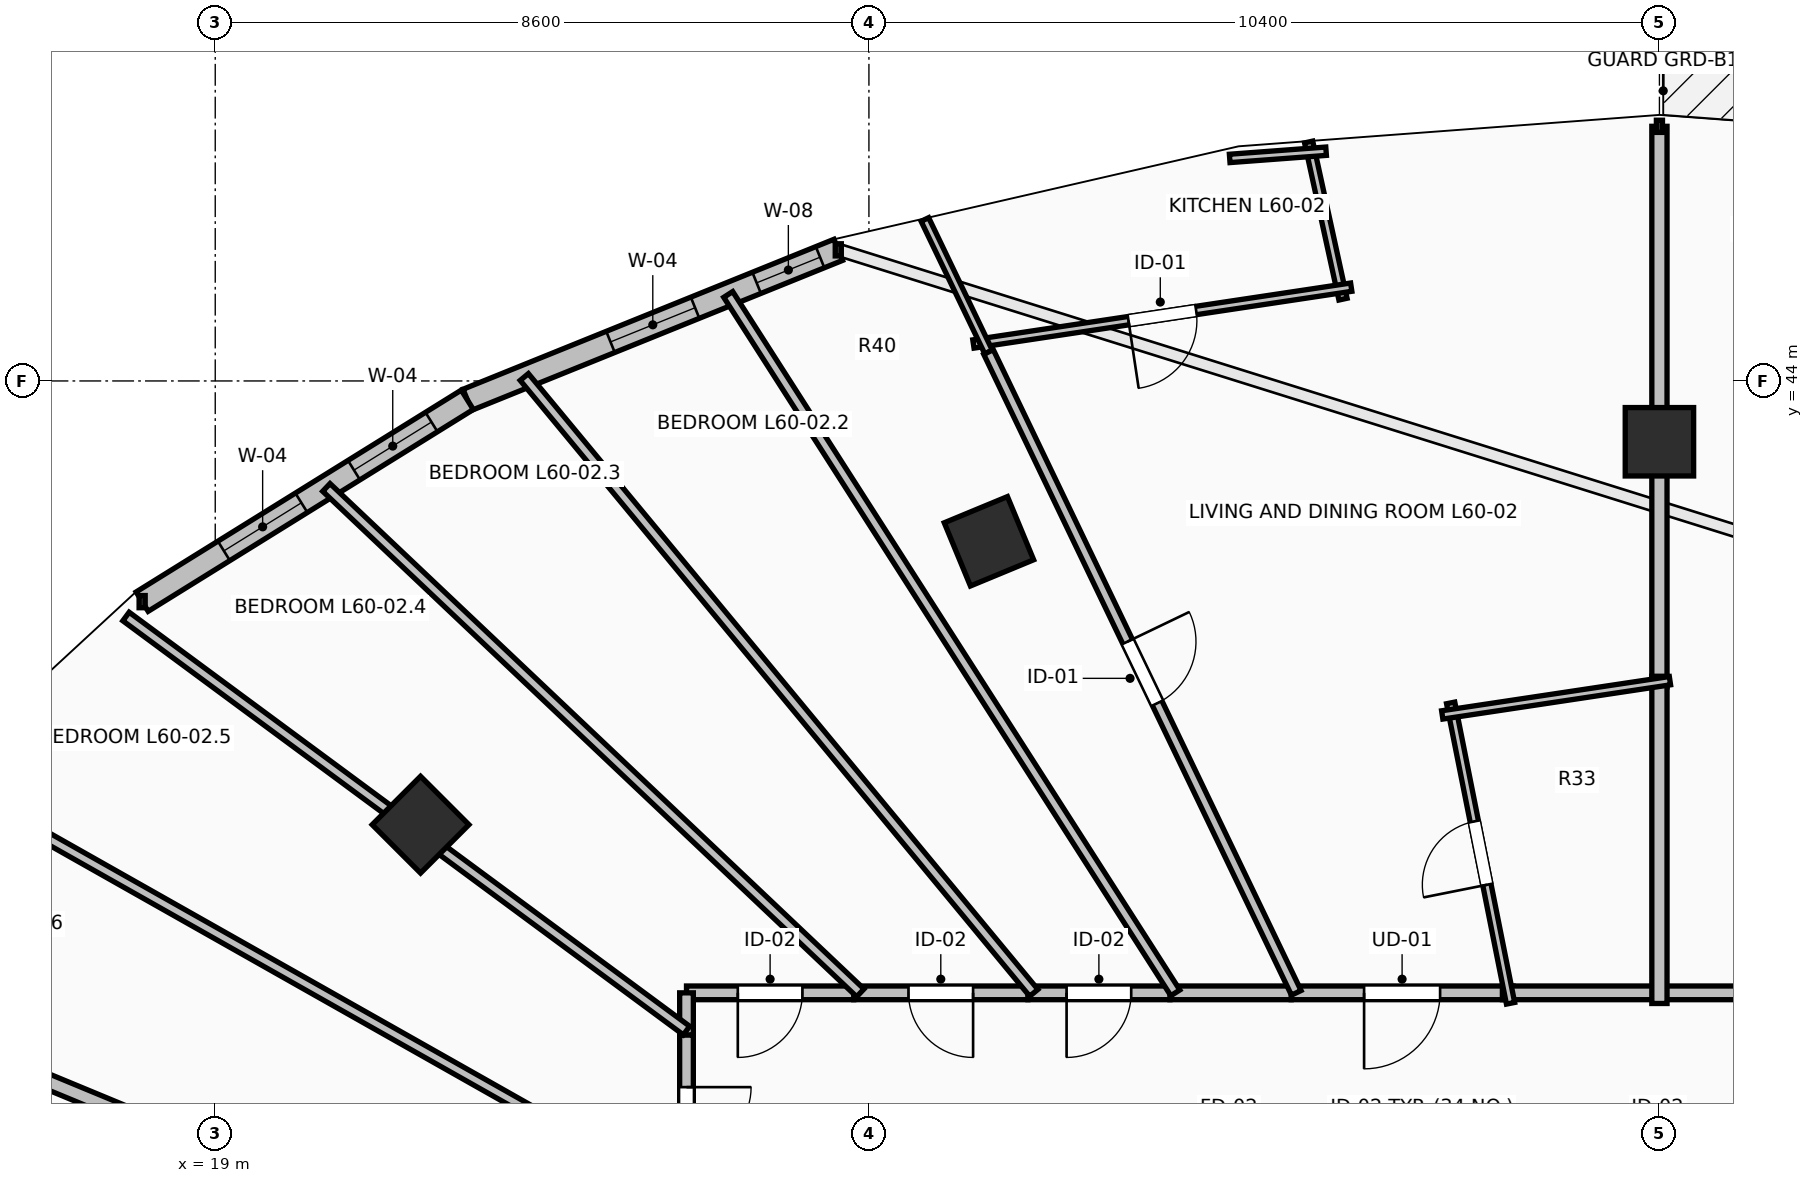
"""IFC4 building model, lengths in metres.
Left out: names, types, materials, properties, quantities, classifications, styles, units other than length and angle.
Written with IfcOpenShell. Run it as: python <this file> out.ifc"""

import sys

from ifc_helpers import new_model, si_unit, direction, frame, frame_2d, origin, origin_2d, place, context, subcontext, project, spatial, rectangle, extrude, element, fill, save


model = new_model("IFC4")
c1 = context("Model", 3, precision=1e-05, world=origin(), true_north=direction((0.0, 1.0)))
c2 = subcontext(c1, "Body", "Model", "MODEL_VIEW")
j1 = project(units=[si_unit("LENGTHUNIT", "METRE"), si_unit("PLANEANGLEUNIT", "RADIAN")], contexts=[c1])
p1 = place(None, origin())
s1 = spatial("IfcSite", under=j1, at=p1, CompositionType="ELEMENT")
p2 = place(p1, origin())
s2 = spatial("IfcBuilding", under=s1, at=p2, CompositionType="ELEMENT")
p3 = place(p2, frame((0.0, 0.0, 221.4)))
s3 = spatial("IfcBuildingStorey", under=s2, at=p3, CompositionType="ELEMENT", Elevation=221.4)
for number, where, z_axis, x_axis in (
    (1, (38.0, 43.2, 0.0), (0.0, 0.0, 1.0), (0.0, 1.0, 0.0)),
    (2, (29.179, 41.891, 0.0), (0.0, 0.0, 1.0), (-0.383, 0.924, 0.0)),
    (3, (21.701, 38.162, 0.0), (0.0, 0.0, 1.0), (-0.707, 0.707, 0.0)),
):
    element("IfcColumn", number, at=place(p3, frame(where, z_axis=z_axis, x_axis=x_axis)), inside=s3, PredefinedType="COLUMN", context=c2, shape_type="SweptSolid", body=[
        extrude(rectangle(XDim=0.9, YDim=0.9, at=origin_2d()), origin(), (0.0, 0.0, 1.0), 3.55),
    ])
p4 = place(p3, frame((27.197, 45.725, 0.0), z_axis=(0.0, 0.0, 1.0), x_axis=(-0.927111094334, -0.374786630981, 0.0)))
e4 = element("IfcWall", 4, at=p4, inside=s3, PredefinedType="STANDARD", context=c2, shape_type="SweptSolid", body=[
    extrude(rectangle(XDim=5.264, YDim=0.3, at=frame_2d((2.632, 0.0))), origin(), (0.0, 0.0, 1.0), 3.2),
])
p5 = place(p4, frame((0.258, 0.0, 0.85)))
e5 = element("IfcOpeningElement", 5, at=p5, cuts=e4, PredefinedType="OPENING", context=c2, shape_type="SweptSolid", body=[
    extrude(rectangle(XDim=0.9, YDim=1.8, at=frame_2d((0.45, 0.9))), frame((0.0, 0.165, 0.0), z_axis=(0.0, -1.0, 0.0), x_axis=(1.0, 0.0, 0.0)), (0.0, 0.0, 1.0), 0.33),
])
p6 = place(p4, frame((2.032, 0.0, 0.85)))
e6 = element("IfcOpeningElement", 6, at=p6, cuts=e4, PredefinedType="OPENING", context=c2, shape_type="SweptSolid", body=[
    extrude(rectangle(XDim=1.2, YDim=1.95, at=frame_2d((0.6, 0.975))), frame((0.0, 0.165, 0.0), z_axis=(0.0, -1.0, 0.0), x_axis=(1.0, 0.0, 0.0)), (0.0, 0.0, 1.0), 0.33),
])
p7 = place(p3, frame((22.316, 43.752, 0.0), z_axis=(0.0, 0.0, 1.0), x_axis=(-0.849647657754, -0.527350791858, 0.0)))
e7 = element("IfcWall", 7, at=p7, inside=s3, PredefinedType="STANDARD", context=c2, shape_type="SweptSolid", body=[
    extrude(rectangle(XDim=5.035, YDim=0.3, at=frame_2d((2.518, 0.0))), origin(), (0.0, 0.0, 1.0), 3.2),
])
p8 = place(p7, frame((0.555, 0.0, 0.85)))
e8 = element("IfcOpeningElement", 8, at=p8, cuts=e7, PredefinedType="OPENING", context=c2, shape_type="SweptSolid", body=[
    extrude(rectangle(XDim=1.2, YDim=1.95, at=frame_2d((0.6, 0.975))), frame((0.0, 0.165, 0.0), z_axis=(0.0, -1.0, 0.0), x_axis=(1.0, 0.0, 0.0)), (0.0, 0.0, 1.0), 0.33),
])
p9 = place(p7, frame((2.569, 0.0, 0.85)))
e9 = element("IfcOpeningElement", 9, at=p9, cuts=e7, PredefinedType="OPENING", context=c2, shape_type="SweptSolid", body=[
    extrude(rectangle(XDim=1.2, YDim=1.95, at=frame_2d((0.6, 0.975))), frame((0.0, 0.165, 0.0), z_axis=(0.0, -1.0, 0.0), x_axis=(1.0, 0.0, 0.0)), (0.0, 0.0, 1.0), 0.33),
])
p10 = place(p3, frame((39.157, 35.95, 0.0), z_axis=(0.0, 0.0, 1.0), x_axis=(-1.0, 0.0, 0.0)))
e10 = element("IfcWall", 10, at=p10, inside=s3, PredefinedType="PARTITIONING", context=c2, shape_type="SweptSolid", body=[
    extrude(rectangle(XDim=1.217, YDim=0.18, at=frame_2d((0.608, 0.0))), origin(), (0.0, 0.0, 1.0), 3.2),
])
p11 = place(p3, frame((36.074, 35.95, 0.0), z_axis=(0.0, 0.0, 1.0), x_axis=(-1.0, 0.0, 0.0)))
e11 = element("IfcWall", 11, at=p11, inside=s3, PredefinedType="PARTITIONING", context=c2, shape_type="SweptSolid", body=[
    extrude(rectangle(XDim=2.919, YDim=0.18, at=frame_2d((1.459, 0.0))), origin(), (0.0, 0.0, 1.0), 3.2),
])
p12 = place(p11, frame((0.959, 0.0, 0.0)))
e12 = element("IfcOpeningElement", 12, at=p12, cuts=e11, PredefinedType="OPENING", context=c2, shape_type="SweptSolid", body=[
    extrude(rectangle(XDim=1.0, YDim=2.15, at=frame_2d((0.5, 1.075))), frame((0.0, 0.105, 0.0), z_axis=(0.0, -1.0, 0.0), x_axis=(1.0, 0.0, 0.0)), (0.0, 0.0, 1.0), 0.21),
])
p13 = place(p3, frame((38.08, 35.95, 0.0), z_axis=(0.0, 0.0, 1.0), x_axis=(-1.0, 0.0, 0.0)))
e13 = element("IfcWall", 13, at=p13, inside=s3, PredefinedType="PARTITIONING", context=c2, shape_type="SweptSolid", body=[
    extrude(rectangle(XDim=2.146, YDim=0.18, at=frame_2d((1.073, 0.0))), origin(), (0.0, 0.0, 1.0), 3.2),
])
p14 = place(p3, frame((33.155, 35.95, 0.0), z_axis=(0.0, 0.0, 1.0), x_axis=(-1.0, 0.0, 0.0)))
e14 = element("IfcWall", 14, at=p14, inside=s3, PredefinedType="PARTITIONING", context=c2, shape_type="SweptSolid", body=[
    extrude(rectangle(XDim=1.595, YDim=0.18, at=frame_2d((0.797, 0.0))), origin(), (0.0, 0.0, 1.0), 3.2),
])
p15 = place(p3, frame((31.56, 35.95, 0.0), z_axis=(0.0, 0.0, 1.0), x_axis=(-1.0, 0.0, 0.0)))
e15 = element("IfcWall", 15, at=p15, inside=s3, PredefinedType="PARTITIONING", context=c2, shape_type="SweptSolid", body=[
    extrude(rectangle(XDim=1.869, YDim=0.18, at=frame_2d((0.935, 0.0))), origin(), (0.0, 0.0, 1.0), 2.392),
])
p16 = place(p15, frame((0.51, 0.0, 0.0)))
e16 = element("IfcOpeningElement", 16, at=p16, cuts=e15, PredefinedType="OPENING", context=c2, shape_type="SweptSolid", body=[
    extrude(rectangle(XDim=0.85, YDim=2.1, at=frame_2d((0.425, 1.05))), frame((0.0, 0.105, 0.0), z_axis=(0.0, -1.0, 0.0), x_axis=(1.0, 0.0, 0.0)), (0.0, 0.0, 1.0), 0.21),
])
p17 = place(p3, frame((29.691, 35.95, 0.0), z_axis=(0.0, 0.0, 1.0), x_axis=(-1.0, 0.0, 0.0)))
e17 = element("IfcWall", 17, at=p17, inside=s3, PredefinedType="PARTITIONING", context=c2, shape_type="SweptSolid", body=[
    extrude(rectangle(XDim=2.291, YDim=0.18, at=frame_2d((1.146, 0.0))), origin(), (0.0, 0.0, 1.0), 2.392),
])
p18 = place(p17, frame((0.72, 0.0, 0.0)))
e18 = element("IfcOpeningElement", 18, at=p18, cuts=e17, PredefinedType="OPENING", context=c2, shape_type="SweptSolid", body=[
    extrude(rectangle(XDim=0.85, YDim=2.1, at=frame_2d((0.425, 1.05))), frame((0.0, 0.105, 0.0), z_axis=(0.0, -1.0, 0.0), x_axis=(1.0, 0.0, 0.0)), (0.0, 0.0, 1.0), 0.21),
])
p19 = place(p3, frame((27.4, 35.95, 0.0), z_axis=(0.0, 0.0, 1.0), x_axis=(-1.0, 0.0, 0.0)))
e19 = element("IfcWall", 19, at=p19, inside=s3, PredefinedType="PARTITIONING", context=c2, shape_type="SweptSolid", body=[
    extrude(rectangle(XDim=2.2, YDim=0.18, at=frame_2d((1.1, 0.0))), origin(), (0.0, 0.0, 1.0), 2.834),
])
p20 = place(p19, frame((0.675, 0.0, 0.0)))
e20 = element("IfcOpeningElement", 20, at=p20, cuts=e19, PredefinedType="OPENING", context=c2, shape_type="SweptSolid", body=[
    extrude(rectangle(XDim=0.85, YDim=2.1, at=frame_2d((0.425, 1.05))), frame((0.0, 0.105, 0.0), z_axis=(0.0, -1.0, 0.0), x_axis=(1.0, 0.0, 0.0)), (0.0, 0.0, 1.0), 0.21),
])
p21 = place(p3, frame((25.2, 35.95, 0.0), z_axis=(0.0, 0.0, 1.0), x_axis=(0.0, -1.0, 0.0)))
e21 = element("IfcWall", 21, at=p21, inside=s3, PredefinedType="PARTITIONING", context=c2, shape_type="SweptSolid", body=[
    extrude(rectangle(XDim=0.556, YDim=0.18, at=frame_2d((0.278, 0.0))), origin(), (0.0, 0.0, 1.0), 3.2),
])
p22 = place(p3, frame((25.2, 35.394, 0.0), z_axis=(0.0, 0.0, 1.0), x_axis=(0.0, -1.0, 0.0)))
e22 = element("IfcWall", 22, at=p22, inside=s3, PredefinedType="PARTITIONING", context=c2, shape_type="SweptSolid", body=[
    extrude(rectangle(XDim=2.219, YDim=0.18, at=frame_2d((1.109, 0.0))), origin(), (0.0, 0.0, 1.0), 2.392),
])
p23 = place(p22, frame((0.685, 0.0, 0.0)))
e23 = element("IfcOpeningElement", 23, at=p23, cuts=e22, PredefinedType="OPENING", context=c2, shape_type="SweptSolid", body=[
    extrude(rectangle(XDim=0.85, YDim=2.1, at=frame_2d((0.425, 1.05))), frame((0.0, 0.105, 0.0), z_axis=(0.0, -1.0, 0.0), x_axis=(1.0, 0.0, 0.0)), (0.0, 0.0, 1.0), 0.21),
])
p24 = place(p3, frame((38.0, 47.35, 0.0), z_axis=(0.0, 0.0, 1.0), x_axis=(0.0, -1.0, 0.0)))
e24 = element("IfcWall", 24, at=p24, inside=s3, PredefinedType="PARTITIONING", context=c2, shape_type="SweptSolid", body=[
    extrude(rectangle(XDim=7.375, YDim=0.2, at=frame_2d((3.688, 0.0))), origin(), (0.0, 0.0, 1.0), 2.889),
])
p25 = place(p3, frame((38.0, 40.115, 0.0), z_axis=(0.0, 0.0, 1.0), x_axis=(0.0, -1.0, 0.0)))
e25 = element("IfcWall", 25, at=p25, inside=s3, PredefinedType="PARTITIONING", context=c2, shape_type="SweptSolid", body=[
    extrude(rectangle(XDim=4.305, YDim=0.2, at=frame_2d((2.152, 0.0))), origin(), (0.0, 0.0, 1.0), 2.834),
])
p26 = place(p3, frame((36.042, 35.813, 0.0), z_axis=(0.0, 0.0, 1.0), x_axis=(-0.195521857349, 0.980699343988, 0.0)))
e26 = element("IfcWall", 26, at=p26, inside=s3, PredefinedType="PARTITIONING", context=c2, shape_type="SweptSolid", body=[
    extrude(rectangle(XDim=4.03, YDim=0.11, at=frame_2d((2.015, 0.0))), origin(), (0.0, 0.0, 1.0), 2.834),
])
p27 = place(p26, frame((1.59, 0.0, 0.0)))
e27 = element("IfcOpeningElement", 27, at=p27, cuts=e26, PredefinedType="OPENING", context=c2, shape_type="SweptSolid", body=[
    extrude(rectangle(XDim=0.85, YDim=2.1, at=frame_2d((0.425, 1.05))), frame((0.0, 0.07, 0.0), z_axis=(0.0, -1.0, 0.0), x_axis=(1.0, 0.0, 0.0)), (0.0, 0.0, 1.0), 0.14),
])
p28 = place(p3, frame((35.143, 39.606, 0.0), z_axis=(0.0, 0.0, 1.0), x_axis=(0.988873015636, 0.148762088409, 0.0)))
e28 = element("IfcWall", 28, at=p28, inside=s3, PredefinedType="PARTITIONING", context=c2, shape_type="SweptSolid", body=[
    extrude(rectangle(XDim=3.03, YDim=0.11, at=frame_2d((1.515, 0.0))), origin(), (0.0, 0.0, 1.0), 2.889),
])
p29 = place(p3, frame((33.385, 47.144, 0.0), z_axis=(0.0, 0.0, 1.0), x_axis=(0.213521424511, -0.976938381514, 0.0)))
e29 = element("IfcWall", 29, at=p29, inside=s3, PredefinedType="PARTITIONING", context=c2, shape_type="SweptSolid", body=[
    extrude(rectangle(XDim=2.116, YDim=0.11, at=frame_2d((1.058, 0.0))), origin(), (0.0, 0.0, 1.0), 3.2),
])
p30 = place(p3, frame((33.945, 45.234, 0.0), z_axis=(0.0, 0.0, 1.0), x_axis=(-0.988872134662, -0.148767944424, 0.0)))
e30 = element("IfcWall", 30, at=p30, inside=s3, PredefinedType="PARTITIONING", context=c2, shape_type="SweptSolid", body=[
    extrude(rectangle(XDim=5.027, YDim=0.11, at=frame_2d((2.513, 0.0))), origin(), (0.0, 0.0, 1.0), 3.2),
])
p31 = place(p30, frame((2.063, 0.0, 0.0)))
e31 = element("IfcOpeningElement", 31, at=p31, cuts=e30, PredefinedType="OPENING", context=c2, shape_type="SweptSolid", body=[
    extrude(rectangle(XDim=0.9, YDim=2.1, at=frame_2d((0.45, 1.05))), frame((0.0, 0.07, 0.0), z_axis=(0.0, -1.0, 0.0), x_axis=(1.0, 0.0, 0.0)), (0.0, 0.0, 1.0), 0.14),
])
p32 = place(p3, frame((29.174, 44.381, 0.0), z_axis=(0.0, 0.0, 1.0), x_axis=(-0.432866492457, 0.901458041014, 0.0)))
e32 = element("IfcWall", 32, at=p32, inside=s3, PredefinedType="PARTITIONING", context=c2, shape_type="SweptSolid", body=[
    extrude(rectangle(XDim=1.934, YDim=0.11, at=frame_2d((0.967, 0.0))), origin(), (0.0, 0.0, 1.0), 3.2),
])
p33 = place(p3, frame((33.615, 47.022, 0.0), z_axis=(0.0, 0.0, 1.0), x_axis=(-0.997207179737, -0.074684942803, 0.0)))
e33 = element("IfcWall", 33, at=p33, inside=s3, PredefinedType="PARTITIONING", context=c2, shape_type="SweptSolid", body=[
    extrude(rectangle(XDim=1.272, YDim=0.11, at=frame_2d((0.636, 0.0))), origin(), (0.0, 0.0, 1.0), 3.2),
])
p34 = place(p3, frame((29.174, 44.381, 0.0), z_axis=(0.0, 0.0, 1.0), x_axis=(0.432861754343, -0.901460316169, 0.0)))
e34 = element("IfcWall", 34, at=p34, inside=s3, PredefinedType="PARTITIONING", context=c2, shape_type="SweptSolid", body=[
    extrude(rectangle(XDim=9.353, YDim=0.14, at=frame_2d((4.676, 0.0))), origin(), (0.0, 0.0, 1.0), 2.392),
])
p35 = place(p34, frame((4.226, 0.0, 0.0)))
e35 = element("IfcOpeningElement", 35, at=p35, cuts=e34, PredefinedType="OPENING", context=c2, shape_type="SweptSolid", body=[
    extrude(rectangle(XDim=0.9, YDim=2.1, at=frame_2d((0.45, 1.05))), frame((0.0, 0.085, 0.0), z_axis=(0.0, -1.0, 0.0), x_axis=(1.0, 0.0, 0.0)), (0.0, 0.0, 1.0), 0.17),
])
p36 = place(p3, frame((25.749, 45.138, 0.0), z_axis=(0.0, 0.0, 1.0), x_axis=(0.539168632786, -0.842197830335, 0.0)))
e36 = element("IfcWall", 36, at=p36, inside=s3, PredefinedType="PARTITIONING", context=c2, shape_type="SweptSolid", body=[
    extrude(rectangle(XDim=10.909, YDim=0.14, at=frame_2d((5.455, 0.0))), origin(), (0.0, 0.0, 1.0), 2.392),
])
p37 = place(p3, frame((23.066, 44.052, 0.0), z_axis=(0.0, 0.0, 1.0), x_axis=(0.637453668746, -0.770488689211, 0.0)))
e37 = element("IfcWall", 37, at=p37, inside=s3, PredefinedType="PARTITIONING", context=c2, shape_type="SweptSolid", body=[
    extrude(rectangle(XDim=10.515, YDim=0.14, at=frame_2d((5.258, 0.0))), origin(), (0.0, 0.0, 1.0), 2.392),
])
p38 = place(p3, frame((20.462, 42.599, 0.0), z_axis=(0.0, 0.0, 1.0), x_axis=(0.726274273347, -0.687405033349, 0.0)))
e38 = element("IfcWall", 38, at=p38, inside=s3, PredefinedType="PARTITIONING", context=c2, shape_type="SweptSolid", body=[
    extrude(rectangle(XDim=9.673, YDim=0.14, at=frame_2d((4.836, 0.0))), origin(), (0.0, 0.0, 1.0), 2.734),
])
p39 = place(p3, frame((17.826, 40.901, 0.0), z_axis=(0.0, 0.0, 1.0), x_axis=(0.804363169868, -0.594137939338, 0.0)))
e39 = element("IfcWall", 39, at=p39, inside=s3, PredefinedType="PARTITIONING", context=c2, shape_type="SweptSolid", body=[
    extrude(rectangle(XDim=9.167, YDim=0.14, at=frame_2d((4.584, 0.0))), origin(), (0.0, 0.0, 1.0), 2.392),
])
p40 = place(p3, frame((15.476, 38.731, 0.0), z_axis=(0.0, 0.0, 1.0), x_axis=(0.870572608778, -0.49203997078, 0.0)))
e40 = element("IfcWall", 40, at=p40, inside=s3, PredefinedType="PARTITIONING", context=c2, shape_type="SweptSolid", body=[
    extrude(rectangle(XDim=11.169, YDim=0.14, at=frame_2d((5.585, 0.0))), origin(), (0.0, 0.0, 1.0), 2.734),
])
p41 = place(p3, frame((13.36, 36.206, 0.0), z_axis=(0.0, 0.0, 1.0), x_axis=(0.923875681471, -0.382692729466, 0.0)))
e41 = element("IfcWall", 41, at=p41, inside=s3, PredefinedType="PARTITIONING", context=c2, shape_type="SweptSolid", body=[
    extrude(rectangle(XDim=9.381, YDim=0.2, at=frame_2d((4.69, 0.0))), origin(), (0.0, 0.0, 1.0), 2.734),
])
p42 = place(p5, origin())
e42 = element("IfcWindow", 42, at=p42, inside=s3, PartitioningType="SINGLE_PANEL", PredefinedType="WINDOW", context=c2, shape_type="SweptSolid", body=[
    extrude(rectangle(XDim=0.9, YDim=1.8, at=frame_2d((0.45, 0.9))), frame((0.0, 0.03, 0.0), z_axis=(0.0, -1.0, 0.0), x_axis=(1.0, 0.0, 0.0)), (0.0, 0.0, 1.0), 0.06),
])
fill(e5, e42)
p43 = place(p6, origin())
e43 = element("IfcWindow", 43, at=p43, inside=s3, PartitioningType="SINGLE_PANEL", PredefinedType="WINDOW", context=c2, shape_type="SweptSolid", body=[
    extrude(rectangle(XDim=1.2, YDim=1.95, at=frame_2d((0.6, 0.975))), frame((0.0, 0.03, 0.0), z_axis=(0.0, -1.0, 0.0), x_axis=(1.0, 0.0, 0.0)), (0.0, 0.0, 1.0), 0.06),
])
fill(e6, e43)
p44 = place(p8, origin())
e44 = element("IfcWindow", 44, at=p44, inside=s3, PartitioningType="SINGLE_PANEL", PredefinedType="WINDOW", context=c2, shape_type="SweptSolid", body=[
    extrude(rectangle(XDim=1.2, YDim=1.95, at=frame_2d((0.6, 0.975))), frame((0.0, 0.03, 0.0), z_axis=(0.0, -1.0, 0.0), x_axis=(1.0, 0.0, 0.0)), (0.0, 0.0, 1.0), 0.06),
])
fill(e8, e44)
p45 = place(p9, origin())
e45 = element("IfcWindow", 45, at=p45, inside=s3, PartitioningType="SINGLE_PANEL", PredefinedType="WINDOW", context=c2, shape_type="SweptSolid", body=[
    extrude(rectangle(XDim=1.2, YDim=1.95, at=frame_2d((0.6, 0.975))), frame((0.0, 0.03, 0.0), z_axis=(0.0, -1.0, 0.0), x_axis=(1.0, 0.0, 0.0)), (0.0, 0.0, 1.0), 0.06),
])
fill(e9, e45)
p46 = place(p12, origin())
e46 = element("IfcDoor", 46, at=p46, inside=s3, OperationType="SINGLE_SWING_RIGHT", PredefinedType="DOOR", context=c2, shape_type="SweptSolid", body=[
    extrude(rectangle(XDim=1.0, YDim=2.15, at=frame_2d((0.5, 1.075))), frame((0.0, 0.025, 0.0), z_axis=(0.0, -1.0, 0.0), x_axis=(1.0, 0.0, 0.0)), (0.0, 0.0, 1.0), 0.05),
])
fill(e12, e46)
p47 = place(p27, origin())
e47 = element("IfcDoor", 47, at=p47, inside=s3, OperationType="SINGLE_SWING_LEFT", PredefinedType="DOOR", context=c2, shape_type="SweptSolid", body=[
    extrude(rectangle(XDim=0.85, YDim=2.1, at=frame_2d((0.425, 1.05))), frame((0.0, 0.025, 0.0), z_axis=(0.0, -1.0, 0.0), x_axis=(1.0, 0.0, 0.0)), (0.0, 0.0, 1.0), 0.05),
])
fill(e27, e47)
p48 = place(p31, origin())
e48 = element("IfcDoor", 48, at=p48, inside=s3, OperationType="SINGLE_SWING_RIGHT", PredefinedType="DOOR", context=c2, shape_type="SweptSolid", body=[
    extrude(rectangle(XDim=0.9, YDim=2.1, at=frame_2d((0.45, 1.05))), frame((0.0, 0.025, 0.0), z_axis=(0.0, -1.0, 0.0), x_axis=(1.0, 0.0, 0.0)), (0.0, 0.0, 1.0), 0.05),
])
fill(e31, e48)
p49 = place(p35, origin())
e49 = element("IfcDoor", 49, at=p49, inside=s3, OperationType="SINGLE_SWING_LEFT", PredefinedType="DOOR", context=c2, shape_type="SweptSolid", body=[
    extrude(rectangle(XDim=0.9, YDim=2.1, at=frame_2d((0.45, 1.05))), frame((0.0, 0.025, 0.0), z_axis=(0.0, -1.0, 0.0), x_axis=(1.0, 0.0, 0.0)), (0.0, 0.0, 1.0), 0.05),
])
fill(e35, e49)
p50 = place(p16, origin())
e50 = element("IfcDoor", 50, at=p50, inside=s3, OperationType="SINGLE_SWING_RIGHT", PredefinedType="DOOR", context=c2, shape_type="SweptSolid", body=[
    extrude(rectangle(XDim=0.85, YDim=2.1, at=frame_2d((0.425, 1.05))), frame((0.0, 0.025, 0.0), z_axis=(0.0, -1.0, 0.0), x_axis=(1.0, 0.0, 0.0)), (0.0, 0.0, 1.0), 0.05),
])
fill(e16, e50)
p51 = place(p18, origin())
e51 = element("IfcDoor", 51, at=p51, inside=s3, OperationType="SINGLE_SWING_LEFT", PredefinedType="DOOR", context=c2, shape_type="SweptSolid", body=[
    extrude(rectangle(XDim=0.85, YDim=2.1, at=frame_2d((0.425, 1.05))), frame((0.0, 0.025, 0.0), z_axis=(0.0, -1.0, 0.0), x_axis=(1.0, 0.0, 0.0)), (0.0, 0.0, 1.0), 0.05),
])
fill(e18, e51)
p52 = place(p20, origin())
e52 = element("IfcDoor", 52, at=p52, inside=s3, OperationType="SINGLE_SWING_RIGHT", PredefinedType="DOOR", context=c2, shape_type="SweptSolid", body=[
    extrude(rectangle(XDim=0.85, YDim=2.1, at=frame_2d((0.425, 1.05))), frame((0.0, 0.025, 0.0), z_axis=(0.0, -1.0, 0.0), x_axis=(1.0, 0.0, 0.0)), (0.0, 0.0, 1.0), 0.05),
])
fill(e20, e52)
p53 = place(p23, origin())
e53 = element("IfcDoor", 53, at=p53, inside=s3, OperationType="SINGLE_SWING_LEFT", PredefinedType="DOOR", context=c2, shape_type="SweptSolid", body=[
    extrude(rectangle(XDim=0.85, YDim=2.1, at=frame_2d((0.425, 1.05))), frame((0.0, 0.025, 0.0), z_axis=(0.0, -1.0, 0.0), x_axis=(1.0, 0.0, 0.0)), (0.0, 0.0, 1.0), 0.05),
])
fill(e23, e53)
save(model, sys.argv[1])
